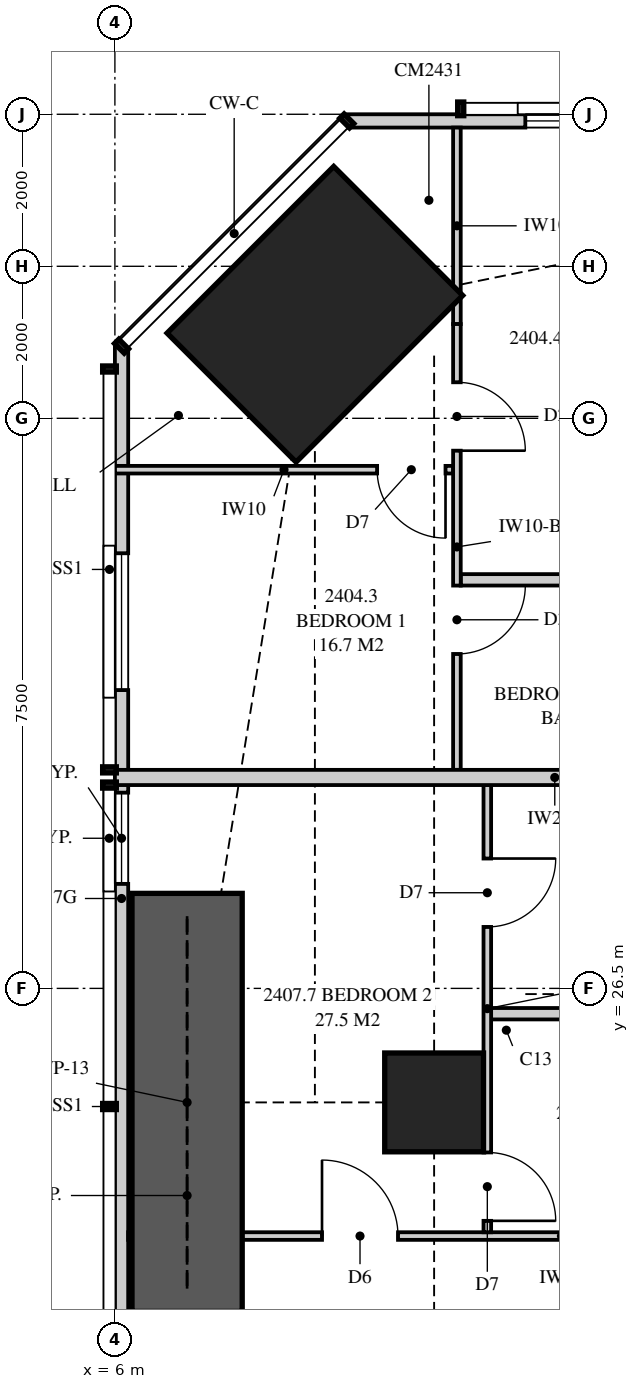
"""IFC4 building model, lengths in metres.
Left out: names, types, materials, properties, quantities, classifications, styles, units other than length and angle.
Written with IfcOpenShell. Run it as: python <this file> out.ifc"""

import sys

from ifc_helpers import new_model, si_unit, direction, frame, frame_2d, origin, origin_2d, place, context, subcontext, project, spatial, polyline, rectangle, outline, extrude, element, fill, save


model = new_model("IFC4")
c1 = context("Model", 3, precision=1e-05, world=origin(), true_north=direction((0.0, 1.0)))
c2 = subcontext(c1, "Body", "Model", "MODEL_VIEW")
j1 = project(units=[si_unit("LENGTHUNIT", "METRE"), si_unit("PLANEANGLEUNIT", "RADIAN")], contexts=[c1])
p1 = place(None, origin())
s1 = spatial("IfcSite", under=j1, at=p1, CompositionType="ELEMENT")
p2 = place(p1, origin())
s2 = spatial("IfcBuilding", under=s1, at=p2, CompositionType="ELEMENT")
p3 = place(p2, frame((0.0, 0.0, 91.45)))
s3 = spatial("IfcBuildingStorey", under=s2, at=p3, CompositionType="ELEMENT", Elevation=91.45)
p4 = place(p3, frame((8.631, 35.369, 0.0), z_axis=(0.0, 0.0, 1.0), x_axis=(0.707106781187, -0.707106781187, 0.0)))
e1 = element("IfcColumn", 1, at=p4, inside=s3, PredefinedType="COLUMN", context=c2, shape_type="SweptSolid", body=[
    extrude(rectangle(XDim=2.4, YDim=3.1, at=origin_2d()), origin(), (0.0, 0.0, 1.0), 3.35),
])
p5 = place(p3, frame((10.2, 25.0, 0.0), z_axis=(0.0, 0.0, 1.0), x_axis=(1.0, 0.0, 0.0)))
e2 = element("IfcColumn", 2, at=p5, inside=s3, PredefinedType="COLUMN", context=c2, shape_type="SweptSolid", body=[
    extrude(rectangle(XDim=1.3, YDim=1.3, at=origin_2d()), origin(), (0.0, 0.0, 1.0), 3.35),
])
p6 = place(p3, frame((19.675, 37.913, 0.0), z_axis=(0.0, 0.0, 1.0), x_axis=(-1.0, 0.0, 0.0)))
e3 = element("IfcWall", 3, at=p6, inside=s3, PredefinedType="SOLIDWALL", context=c2, shape_type="SweptSolid", body=[
    extrude(outline(polyline([(0.0, 0.0), (10.624, 0.0), (10.624, 3.11), (3.003, 3.11), (3.003, 2.15), (2.958, 2.15), (2.958, 3.11), (2.8, 3.11), (2.8, 2.15), (0.0, 2.15), (0.0, 0.0)])), frame((0.0, 0.087, 0.0), z_axis=(0.0, -1.0, 0.0), x_axis=(1.0, 0.0, 0.0)), (0.0, 0.0, 1.0), 0.175),
])
p7 = place(p6, frame((6.475, 0.0, 0.4)))
e4 = element("IfcOpeningElement", 4, at=p7, cuts=e3, PredefinedType="OPENING", context=c2, shape_type="SweptSolid", body=[
    extrude(rectangle(XDim=1.8, YDim=1.7, at=frame_2d((0.9, 0.85))), frame((0.0, 0.097, 0.0), z_axis=(0.0, -1.0, 0.0), x_axis=(1.0, 0.0, 0.0)), (0.0, 0.0, 1.0), 0.195),
])
p8 = place(p3, frame((6.087, 34.949, 0.0), z_axis=(0.0, 0.0, 1.0), x_axis=(0.0, -1.0, 0.0)))
e5 = element("IfcWall", 5, at=p8, inside=s3, PredefinedType="SOLIDWALL", context=c2, shape_type="SweptSolid", body=[
    extrude(outline(polyline([(0.0, 0.0), (14.532, 0.0), (14.532, 2.15), (9.949, 2.15), (9.949, 3.11), (9.823, 3.11), (9.823, 2.15), (9.73, 2.15), (9.73, 3.11), (0.0, 3.11), (0.0, 0.0)])), frame((0.0, 0.087, 0.0), z_axis=(0.0, -1.0, 0.0), x_axis=(1.0, 0.0, 0.0)), (0.0, 0.0, 1.0), 0.175),
])
p9 = place(p8, frame((2.724, 0.0, 0.4)))
e6 = element("IfcOpeningElement", 6, at=p9, cuts=e5, PredefinedType="OPENING", context=c2, shape_type="SweptSolid", body=[
    extrude(rectangle(XDim=1.8, YDim=1.7, at=frame_2d((0.9, 0.85))), frame((0.0, 0.097, 0.0), z_axis=(0.0, -1.0, 0.0), x_axis=(1.0, 0.0, 0.0)), (0.0, 0.0, 1.0), 0.195),
])
p10 = place(p8, frame((5.874, 0.0, 0.4)))
e7 = element("IfcOpeningElement", 7, at=p10, cuts=e5, PredefinedType="OPENING", context=c2, shape_type="SweptSolid", body=[
    extrude(rectangle(XDim=1.2, YDim=1.7, at=frame_2d((0.6, 0.85))), frame((0.0, 0.097, 0.0), z_axis=(0.0, -1.0, 0.0), x_axis=(1.0, 0.0, 0.0)), (0.0, 0.0, 1.0), 0.195),
])
p11 = place(p3, frame((10.5, 37.825, 0.0), z_axis=(0.0, 0.0, 1.0), x_axis=(0.0, -1.0, 0.0)))
e8 = element("IfcWall", 8, at=p11, inside=s3, PredefinedType="PARTITIONING", context=c2, shape_type="SweptSolid", body=[
    extrude(outline(polyline([(0.0, 0.0), (2.585, 0.0), (2.585, 2.15), (1.198, 2.15), (1.198, 3.11), (0.0, 3.11), (0.0, 0.0)])), frame((0.0, 0.05, 0.0), z_axis=(0.0, -1.0, 0.0), x_axis=(1.0, 0.0, 0.0)), (0.0, 0.0, 1.0), 0.1),
])
p12 = place(p3, frame((10.5, 35.24, 0.0), z_axis=(0.0, 0.0, 1.0), x_axis=(0.0, -1.0, 0.0)))
e9 = element("IfcWall", 9, at=p12, inside=s3, PredefinedType="PARTITIONING", context=c2, shape_type="SweptSolid", body=[
    extrude(outline(polyline([(0.0, 0.0), (5.865, 0.0), (5.865, 2.51), (0.368, 2.51), (0.368, 2.15), (0.0, 2.15), (0.0, 0.0)])), frame((0.0, 0.05, 0.0), z_axis=(0.0, -1.0, 0.0), x_axis=(1.0, 0.0, 0.0)), (0.0, 0.0, 1.0), 0.1),
])
p13 = place(p12, frame((0.766, 0.0, 0.0)))
e10 = element("IfcOpeningElement", 10, at=p13, cuts=e9, PredefinedType="OPENING", context=c2, shape_type="SweptSolid", body=[
    extrude(rectangle(XDim=0.9, YDim=2.1, at=frame_2d((0.45, 1.05))), frame((0.0, 0.06, 0.0), z_axis=(0.0, -1.0, 0.0), x_axis=(1.0, 0.0, 0.0)), (0.0, 0.0, 1.0), 0.12),
])
p14 = place(p12, frame((3.441, 0.0, 0.0)))
e11 = element("IfcOpeningElement", 11, at=p14, cuts=e9, PredefinedType="OPENING", context=c2, shape_type="SweptSolid", body=[
    extrude(rectangle(XDim=0.9, YDim=2.1, at=frame_2d((0.45, 1.05))), frame((0.0, 0.06, 0.0), z_axis=(0.0, -1.0, 0.0), x_axis=(1.0, 0.0, 0.0)), (0.0, 0.0, 1.0), 0.12),
])
p15 = place(p3, frame((6.0, 33.324, 0.0), z_axis=(0.0, 0.0, 1.0), x_axis=(1.0, 0.0, 0.0)))
e12 = element("IfcWall", 12, at=p15, inside=s3, PredefinedType="PARTITIONING", context=c2, shape_type="SweptSolid", body=[
    extrude(outline(polyline([(0.0, 0.0), (4.45, 0.0), (4.45, 3.11), (4.45, 2.51), (3.171, 2.51), (3.171, 2.15), (1.429, 2.15), (1.429, 3.11), (0.0, 3.11), (0.0, 0.0)])), frame((0.0, 0.05, 0.0), z_axis=(0.0, -1.0, 0.0), x_axis=(1.0, 0.0, 0.0)), (0.0, 0.0, 1.0), 0.1),
])
p16 = place(p15, frame((3.45, 0.0, 0.0)))
e13 = element("IfcOpeningElement", 13, at=p16, cuts=e12, PredefinedType="OPENING", context=c2, shape_type="SweptSolid", body=[
    extrude(rectangle(XDim=0.9, YDim=2.1, at=frame_2d((0.45, 1.05))), frame((0.0, 0.06, 0.0), z_axis=(0.0, -1.0, 0.0), x_axis=(1.0, 0.0, 0.0)), (0.0, 0.0, 1.0), 0.12),
])
p17 = place(p3, frame((10.55, 31.875, 0.0), z_axis=(0.0, 0.0, 1.0), x_axis=(1.0, 0.0, 0.0)))
e14 = element("IfcWall", 14, at=p17, inside=s3, PredefinedType="PLUMBINGWALL", context=c2, shape_type="SweptSolid", body=[
    extrude(outline(polyline([(0.0, 0.0), (3.5, 0.0), (3.5, 3.11), (0.935, 3.11), (0.935, 2.51), (0.0, 2.51), (0.0, 3.11), (0.0, 0.0)])), frame((0.0, 0.075, 0.0), z_axis=(0.0, -1.0, 0.0), x_axis=(1.0, 0.0, 0.0)), (0.0, 0.0, 1.0), 0.15),
])
p18 = place(p17, frame((2.2, 0.0, 0.0)))
e15 = element("IfcOpeningElement", 15, at=p18, cuts=e14, PredefinedType="OPENING", context=c2, shape_type="SweptSolid", body=[
    extrude(rectangle(XDim=0.9, YDim=2.1, at=frame_2d((0.45, 1.05))), frame((0.0, 0.085, 0.0), z_axis=(0.0, -1.0, 0.0), x_axis=(1.0, 0.0, 0.0)), (0.0, 0.0, 1.0), 0.17),
])
p19 = place(p3, frame((6.0, 29.275, 0.0), z_axis=(0.0, 0.0, 1.0), x_axis=(1.0, 0.0, 0.0)))
e16 = element("IfcWall", 16, at=p19, inside=s3, PredefinedType="PARTITIONING", context=c2, shape_type="SweptSolid", body=[
    extrude(outline(polyline([(0.0, 0.0), (11.575, 0.0), (11.575, 3.11), (11.212, 3.11), (11.212, 2.541), (10.538, 2.541), (10.538, 3.11), (5.51, 3.11), (5.51, 2.51), (2.969, 2.51), (2.969, 2.541), (2.565, 2.541), (2.565, 2.15), (0.721, 2.15), (0.721, 3.11), (0.0, 3.11), (0.0, 0.0)])), frame((0.0, 0.1, 0.0), z_axis=(0.0, -1.0, 0.0), x_axis=(1.0, 0.0, 0.0)), (0.0, 0.0, 1.0), 0.2),
])
p20 = place(p3, frame((6.175, 23.242, 0.0), z_axis=(0.0, 0.0, 1.0), x_axis=(1.0, 0.0, 0.0)))
e17 = element("IfcWall", 17, at=p20, inside=s3, PredefinedType="PARTITIONING", context=c2, shape_type="SweptSolid", body=[
    extrude(outline(polyline([(0.529, 2.15), (0.0, 2.15), (0.0, 0.0), (0.529, 0.0), (0.529, 0.268), (1.021, 0.268), (1.021, 0.0), (11.4, 0.0), (11.4, 3.11), (5.285, 3.11), (5.285, 2.51), (2.765, 2.51), (2.765, 3.11), (1.635, 3.11), (1.635, 2.15), (1.021, 2.15), (1.021, 1.882), (0.529, 1.882), (0.529, 2.15)])), frame((0.0, 0.05, 0.0), z_axis=(0.0, -1.0, 0.0), x_axis=(1.0, 0.0, 0.0)), (0.0, 0.0, 1.0), 0.1),
])
p21 = place(p20, frame((2.55, 0.0, 0.0)))
e18 = element("IfcOpeningElement", 18, at=p21, cuts=e17, PredefinedType="OPENING", context=c2, shape_type="SweptSolid", body=[
    extrude(rectangle(XDim=1.0, YDim=2.1, at=frame_2d((0.5, 1.05))), frame((0.0, 0.06, 0.0), z_axis=(0.0, -1.0, 0.0), x_axis=(1.0, 0.0, 0.0)), (0.0, 0.0, 1.0), 0.12),
])
p22 = place(p3, frame((10.9, 23.292, 0.0), z_axis=(0.0, 0.0, 1.0), x_axis=(0.0, 1.0, 0.0)))
e19 = element("IfcWall", 19, at=p22, inside=s3, PredefinedType="PARTITIONING", context=c2, shape_type="SweptSolid", body=[
    extrude(outline(polyline([(0.0, 0.0), (5.883, 0.0), (5.883, 3.11), (5.883, 2.51), (1.768, 2.51), (0.0, 2.51), (0.0, 3.11), (0.0, 0.0)])), frame((0.0, 0.05, 0.0), z_axis=(0.0, -1.0, 0.0), x_axis=(1.0, 0.0, 0.0)), (0.0, 0.0, 1.0), 0.1),
])
p23 = place(p22, frame((0.15, 0.0, 0.0)))
e20 = element("IfcOpeningElement", 20, at=p23, cuts=e19, PredefinedType="OPENING", context=c2, shape_type="SweptSolid", body=[
    extrude(rectangle(XDim=0.9, YDim=2.1, at=frame_2d((0.45, 1.05))), frame((0.0, 0.06, 0.0), z_axis=(0.0, -1.0, 0.0), x_axis=(1.0, 0.0, 0.0)), (0.0, 0.0, 1.0), 0.12),
])
p24 = place(p22, frame((4.017, 0.0, 0.0)))
e21 = element("IfcOpeningElement", 21, at=p24, cuts=e19, PredefinedType="OPENING", context=c2, shape_type="SweptSolid", body=[
    extrude(rectangle(XDim=0.9, YDim=2.1, at=frame_2d((0.45, 1.05))), frame((0.0, 0.06, 0.0), z_axis=(0.0, -1.0, 0.0), x_axis=(1.0, 0.0, 0.0)), (0.0, 0.0, 1.0), 0.12),
])
p25 = place(p3, frame((10.95, 26.167, 0.0), z_axis=(0.0, 0.0, 1.0), x_axis=(1.0, 0.0, 0.0)))
e22 = element("IfcWall", 22, at=p25, inside=s3, PredefinedType="PLUMBINGWALL", context=c2, shape_type="SweptSolid", body=[
    extrude(outline(polyline([(0.0, 0.0), (6.625, 0.0), (6.625, 3.11), (6.625, 2.541), (0.535, 2.541), (0.535, 2.51), (0.0, 2.51), (0.0, 3.11), (0.0, 0.0)])), frame((0.0, 0.075, 0.0), z_axis=(0.0, -1.0, 0.0), x_axis=(1.0, 0.0, 0.0)), (0.0, 0.0, 1.0), 0.15),
])
p26 = place(p3, frame((6.95, 22.25, 0.0), z_axis=(0.0, 0.0, 1.0), x_axis=(0.0, 1.0, 0.0)))
e23 = element("IfcWall", 23, at=p26, inside=s3, PredefinedType="SHEAR", context=c2, shape_type="SweptSolid", body=[
    extrude(rectangle(XDim=5.5, YDim=1.45, at=frame_2d((2.75, 0.0))), origin(), (0.0, 0.0, 1.0), 3.35),
])
p27 = place(p7, origin())
e24 = element("IfcWindow", 24, at=p27, inside=s3, PartitioningType="SINGLE_PANEL", PredefinedType="WINDOW", context=c2, shape_type="SweptSolid", body=[
    extrude(rectangle(XDim=1.8, YDim=1.7, at=frame_2d((0.9, 0.85))), frame((0.0, 0.03, 0.0), z_axis=(0.0, -1.0, 0.0), x_axis=(1.0, 0.0, 0.0)), (0.0, 0.0, 1.0), 0.06),
])
fill(e4, e24)
p28 = place(p9, origin())
e25 = element("IfcWindow", 25, at=p28, inside=s3, PartitioningType="SINGLE_PANEL", PredefinedType="WINDOW", context=c2, shape_type="SweptSolid", body=[
    extrude(rectangle(XDim=1.8, YDim=1.7, at=frame_2d((0.9, 0.85))), frame((0.0, 0.03, 0.0), z_axis=(0.0, -1.0, 0.0), x_axis=(1.0, 0.0, 0.0)), (0.0, 0.0, 1.0), 0.06),
])
fill(e6, e25)
p29 = place(p10, origin())
e26 = element("IfcWindow", 26, at=p29, inside=s3, PartitioningType="SINGLE_PANEL", PredefinedType="WINDOW", context=c2, shape_type="SweptSolid", body=[
    extrude(rectangle(XDim=1.2, YDim=1.7, at=frame_2d((0.6, 0.85))), frame((0.0, 0.03, 0.0), z_axis=(0.0, -1.0, 0.0), x_axis=(1.0, 0.0, 0.0)), (0.0, 0.0, 1.0), 0.06),
])
fill(e7, e26)
p30 = place(p16, frame((0.9, 0.0, 0.0), z_axis=(0.0, 0.0, 1.0), x_axis=(-1.0, 0.0, 0.0)))
e27 = element("IfcDoor", 27, at=p30, inside=s3, OperationType="SINGLE_SWING_LEFT", PredefinedType="DOOR", context=c2, shape_type="SweptSolid", body=[
    extrude(rectangle(XDim=0.9, YDim=2.1, at=frame_2d((0.45, 1.05))), frame((0.0, 0.025, 0.0), z_axis=(0.0, -1.0, 0.0), x_axis=(1.0, 0.0, 0.0)), (0.0, 0.0, 1.0), 0.05),
])
fill(e13, e27)
p31 = place(p13, origin())
e28 = element("IfcDoor", 28, at=p31, inside=s3, OperationType="SINGLE_SWING_RIGHT", PredefinedType="DOOR", context=c2, shape_type="SweptSolid", body=[
    extrude(rectangle(XDim=0.9, YDim=2.1, at=frame_2d((0.45, 1.05))), frame((0.0, 0.025, 0.0), z_axis=(0.0, -1.0, 0.0), x_axis=(1.0, 0.0, 0.0)), (0.0, 0.0, 1.0), 0.05),
])
fill(e10, e28)
p32 = place(p14, origin())
e29 = element("IfcDoor", 29, at=p32, inside=s3, OperationType="SINGLE_SWING_LEFT", PredefinedType="DOOR", context=c2, shape_type="SweptSolid", body=[
    extrude(rectangle(XDim=0.9, YDim=2.1, at=frame_2d((0.45, 1.05))), frame((0.0, 0.025, 0.0), z_axis=(0.0, -1.0, 0.0), x_axis=(1.0, 0.0, 0.0)), (0.0, 0.0, 1.0), 0.05),
])
fill(e11, e29)
p33 = place(p21, origin())
e30 = element("IfcDoor", 30, at=p33, inside=s3, OperationType="SINGLE_SWING_LEFT", PredefinedType="DOOR", context=c2, shape_type="SweptSolid", body=[
    extrude(rectangle(XDim=1.0, YDim=2.1, at=frame_2d((0.5, 1.05))), frame((0.0, 0.025, 0.0), z_axis=(0.0, -1.0, 0.0), x_axis=(1.0, 0.0, 0.0)), (0.0, 0.0, 1.0), 0.05),
])
fill(e18, e30)
p34 = place(p23, frame((0.9, 0.0, 0.0), z_axis=(0.0, 0.0, 1.0), x_axis=(-1.0, 0.0, 0.0)))
e31 = element("IfcDoor", 31, at=p34, inside=s3, OperationType="SINGLE_SWING_RIGHT", PredefinedType="DOOR", context=c2, shape_type="SweptSolid", body=[
    extrude(rectangle(XDim=0.9, YDim=2.1, at=frame_2d((0.45, 1.05))), frame((0.0, 0.025, 0.0), z_axis=(0.0, -1.0, 0.0), x_axis=(1.0, 0.0, 0.0)), (0.0, 0.0, 1.0), 0.05),
])
fill(e20, e31)
p35 = place(p24, frame((0.9, 0.0, 0.0), z_axis=(0.0, 0.0, 1.0), x_axis=(-1.0, 0.0, 0.0)))
e32 = element("IfcDoor", 32, at=p35, inside=s3, OperationType="SINGLE_SWING_LEFT", PredefinedType="DOOR", context=c2, shape_type="SweptSolid", body=[
    extrude(rectangle(XDim=0.9, YDim=2.1, at=frame_2d((0.45, 1.05))), frame((0.0, 0.025, 0.0), z_axis=(0.0, -1.0, 0.0), x_axis=(1.0, 0.0, 0.0)), (0.0, 0.0, 1.0), 0.05),
])
fill(e21, e32)
save(model, sys.argv[1])
